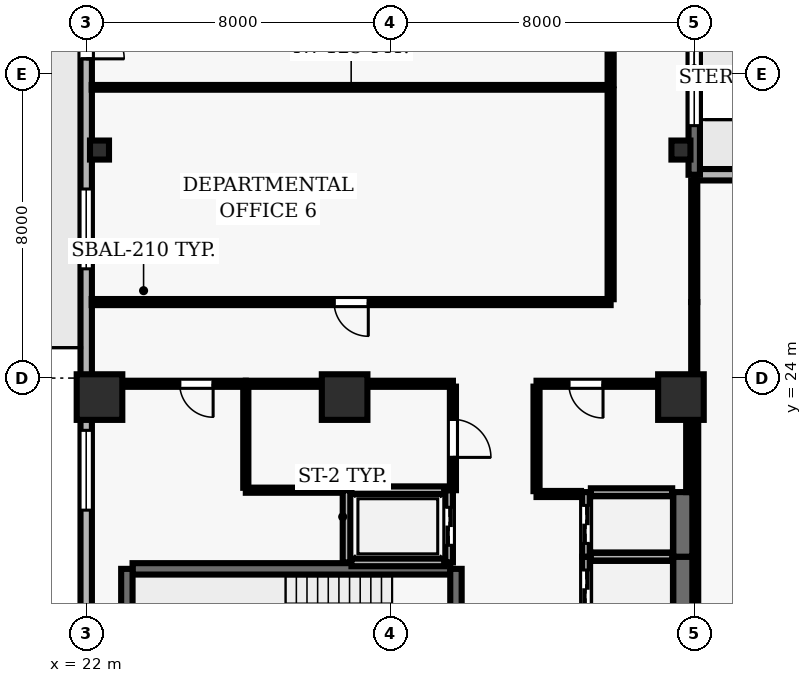
"""IFC4 building model, lengths in metres.
Left out: names, types, materials, properties, quantities, classifications, styles, units other than length and angle.
Written with IfcOpenShell. Run it as: python <this file> out.ifc"""

import sys

from ifc_helpers import new_model, si_unit, direction, frame, frame_2d, origin, origin_2d, place, context, subcontext, project, spatial, rectangle, hollow_rectangle, extrude, element, fill, save


model = new_model("IFC4")
c1 = context("Model", 3, precision=1e-05, world=origin(), true_north=direction((0.0, 1.0)))
c2 = subcontext(c1, "Body", "Model", "MODEL_VIEW")
j1 = project(units=[si_unit("LENGTHUNIT", "METRE"), si_unit("PLANEANGLEUNIT", "RADIAN")], contexts=[c1])
p1 = place(None, origin())
s1 = spatial("IfcSite", under=j1, at=p1, CompositionType="ELEMENT")
p2 = place(p1, origin())
s2 = spatial("IfcBuilding", under=s1, at=p2, CompositionType="ELEMENT")
p3 = place(p2, frame((0.0, 0.0, 115.1)))
s3 = spatial("IfcBuildingStorey", under=s2, at=p3, CompositionType="ELEMENT", Elevation=115.1)
for number, where, z_axis, x_axis in (
    (1, (22.35, 23.5, 0.0), (0.0, 0.0, 1.0), (1.0, 0.0, 0.0)),
    (2, (28.8, 23.5, 0.0), (0.0, 0.0, 1.0), (1.0, 0.0, 0.0)),
    (3, (37.65, 23.5, 0.0), (0.0, 0.0, 1.0), (1.0, 0.0, 0.0)),
):
    element("IfcColumn", number, at=place(p3, frame(where, z_axis=z_axis, x_axis=x_axis)), inside=s3, PredefinedType="COLUMN", context=c2, shape_type="SweptSolid", body=[
        extrude(rectangle(XDim=1.2, YDim=1.2, at=origin_2d()), origin(), (0.0, 0.0, 1.0), 3.9),
    ])
for number, where, z_axis, x_axis in (
    (4, (22.35, 30.0, 0.0), (0.0, 0.0, 1.0), (1.0, 0.0, 0.0)),
    (5, (37.65, 30.0, 0.0), (0.0, 0.0, 1.0), (1.0, 0.0, 0.0)),
):
    element("IfcColumn", number, at=place(p3, frame(where, z_axis=z_axis, x_axis=x_axis)), inside=s3, PredefinedType="COLUMN", context=c2, shape_type="SweptSolid", body=[
        extrude(hollow_rectangle(XDim=0.5, YDim=0.5, WallThickness=0.025, at=origin_2d()), origin(), (0.0, 0.0, 1.0), 3.9),
    ])
p4 = place(p3, frame((46.804, 29.35, 0.0), z_axis=(0.0, 0.0, 1.0), x_axis=(-1.0, 0.0, 0.0)))
e6 = element("IfcWall", 6, at=p4, inside=s3, PredefinedType="SOLIDWALL", context=c2, shape_type="SweptSolid", body=[
    extrude(rectangle(XDim=8.804, YDim=0.3, at=frame_2d((4.402, 0.0))), origin(), (0.0, 0.0, 1.0), 3.69),
])
p5 = place(p4, frame((3.727, 0.0, 0.0)))
e7 = element("IfcOpeningElement", 7, at=p5, cuts=e6, PredefinedType="OPENING", context=c2, shape_type="SweptSolid", body=[
    extrude(rectangle(XDim=1.35, YDim=2.2, at=frame_2d((0.675, 1.1))), frame((0.0, 0.16, 0.0), z_axis=(0.0, -1.0, 0.0), x_axis=(1.0, 0.0, 0.0)), (0.0, 0.0, 1.0), 0.32),
])
p6 = place(p3, frame((38.0, 29.35, 0.0), z_axis=(0.0, 0.0, 1.0), x_axis=(0.0, 1.0, 0.0)))
e8 = element("IfcWall", 8, at=p6, inside=s3, PredefinedType="SOLIDWALL", context=c2, shape_type="SweptSolid", body=[
    extrude(rectangle(XDim=16.75, YDim=0.3, at=frame_2d((8.375, 0.0))), origin(), (0.0, 0.0, 1.0), 3.69),
])
p7 = place(p6, frame((8.7, 0.0, 0.0)))
e9 = element("IfcOpeningElement", 9, at=p7, cuts=e8, PredefinedType="OPENING", context=c2, shape_type="SweptSolid", body=[
    extrude(rectangle(XDim=1.0, YDim=2.2, at=frame_2d((0.5, 1.1))), frame((0.0, 0.16, 0.0), z_axis=(0.0, -1.0, 0.0), x_axis=(1.0, 0.0, 0.0)), (0.0, 0.0, 1.0), 0.32),
])
p8 = place(p6, frame((1.292, 0.0, 0.9)))
e10 = element("IfcOpeningElement", 10, at=p8, cuts=e8, PredefinedType="OPENING", context=c2, shape_type="SweptSolid", body=[
    extrude(rectangle(XDim=3.0, YDim=2.2, at=frame_2d((1.5, 1.1))), frame((0.0, 0.16, 0.0), z_axis=(0.0, -1.0, 0.0), x_axis=(1.0, 0.0, 0.0)), (0.0, 0.0, 1.0), 0.32),
])
p9 = place(p6, frame((12.458, 0.0, 0.9)))
e11 = element("IfcOpeningElement", 11, at=p9, cuts=e8, PredefinedType="OPENING", context=c2, shape_type="SweptSolid", body=[
    extrude(rectangle(XDim=3.0, YDim=2.2, at=frame_2d((1.5, 1.1))), frame((0.0, 0.16, 0.0), z_axis=(0.0, -1.0, 0.0), x_axis=(1.0, 0.0, 0.0)), (0.0, 0.0, 1.0), 0.32),
])
p10 = place(p3, frame((22.0, 46.1, 0.0), z_axis=(0.0, 0.0, 1.0), x_axis=(0.0, -1.0, 0.0)))
e12 = element("IfcWall", 12, at=p10, inside=s3, PredefinedType="SOLIDWALL", context=c2, shape_type="SweptSolid", body=[
    extrude(rectangle(XDim=43.6, YDim=0.3, at=frame_2d((21.8, 0.0))), origin(), (0.0, 0.0, 1.0), 3.69),
])
p11 = place(p10, frame((12.7, 0.0, 0.0)))
e13 = element("IfcOpeningElement", 13, at=p11, cuts=e12, PredefinedType="OPENING", context=c2, shape_type="SweptSolid", body=[
    extrude(rectangle(XDim=1.0, YDim=2.2, at=frame_2d((0.5, 1.1))), frame((0.0, 0.16, 0.0), z_axis=(0.0, -1.0, 0.0), x_axis=(1.0, 0.0, 0.0)), (0.0, 0.0, 1.0), 0.32),
])
p12 = place(p10, frame((17.125, 0.0, 0.9)))
e14 = element("IfcOpeningElement", 14, at=p12, cuts=e12, PredefinedType="OPENING", context=c2, shape_type="SweptSolid", body=[
    extrude(rectangle(XDim=2.1, YDim=1.6, at=frame_2d((1.05, 0.8))), frame((0.0, 0.16, 0.0), z_axis=(0.0, -1.0, 0.0), x_axis=(1.0, 0.0, 0.0)), (0.0, 0.0, 1.0), 0.32),
])
p13 = place(p10, frame((23.475, 0.0, 0.9)))
e15 = element("IfcOpeningElement", 15, at=p13, cuts=e12, PredefinedType="OPENING", context=c2, shape_type="SweptSolid", body=[
    extrude(rectangle(XDim=2.1, YDim=1.6, at=frame_2d((1.05, 0.8))), frame((0.0, 0.16, 0.0), z_axis=(0.0, -1.0, 0.0), x_axis=(1.0, 0.0, 0.0)), (0.0, 0.0, 1.0), 0.32),
])
p14 = place(p10, frame((28.475, 0.0, 0.9)))
e16 = element("IfcOpeningElement", 16, at=p14, cuts=e12, PredefinedType="OPENING", context=c2, shape_type="SweptSolid", body=[
    extrude(rectangle(XDim=2.1, YDim=1.6, at=frame_2d((1.05, 0.8))), frame((0.0, 0.16, 0.0), z_axis=(0.0, -1.0, 0.0), x_axis=(1.0, 0.0, 0.0)), (0.0, 0.0, 1.0), 0.32),
])
p15 = place(p10, frame((34.375, 0.0, 0.9)))
e17 = element("IfcOpeningElement", 17, at=p15, cuts=e12, PredefinedType="OPENING", context=c2, shape_type="SweptSolid", body=[
    extrude(rectangle(XDim=2.1, YDim=1.6, at=frame_2d((1.05, 0.8))), frame((0.0, 0.16, 0.0), z_axis=(0.0, -1.0, 0.0), x_axis=(1.0, 0.0, 0.0)), (0.0, 0.0, 1.0), 0.32),
])
p16 = place(p3, frame((31.58, 18.98, 0.0), z_axis=(0.0, 0.0, 1.0), x_axis=(-1.0, 0.0, 0.0)))
e18 = element("IfcWall", 18, at=p16, inside=s3, PredefinedType="SHEAR", context=c2, shape_type="SweptSolid", body=[
    extrude(rectangle(XDim=8.36, YDim=0.3, at=frame_2d((4.18, 0.0))), origin(), (0.0, 0.0, 1.0), 3.69),
])
p17 = place(p3, frame((23.07, 18.98, 0.0), z_axis=(0.0, 0.0, 1.0), x_axis=(0.0, -1.0, 0.0)))
e19 = element("IfcWall", 19, at=p17, inside=s3, PredefinedType="SHEAR", context=c2, shape_type="SweptSolid", body=[
    extrude(rectangle(XDim=3.51, YDim=0.3, at=frame_2d((1.755, 0.0))), origin(), (0.0, 0.0, 1.0), 3.69),
])
p18 = place(p3, frame((31.73, 15.47, 0.0), z_axis=(0.0, 0.0, 1.0), x_axis=(0.0, 1.0, 0.0)))
e20 = element("IfcWall", 20, at=p18, inside=s3, PredefinedType="SHEAR", context=c2, shape_type="SweptSolid", body=[
    extrude(rectangle(XDim=3.51, YDim=0.3, at=frame_2d((1.755, 0.0))), origin(), (0.0, 0.0, 1.0), 3.69),
])
p19 = place(p18, frame((1.18, 0.0, 0.0)))
e21 = element("IfcOpeningElement", 21, at=p19, cuts=e20, PredefinedType="OPENING", context=c2, shape_type="SweptSolid", body=[
    extrude(rectangle(XDim=1.15, YDim=2.15, at=frame_2d((0.575, 1.075))), frame((0.0, 0.16, 0.0), z_axis=(0.0, -1.0, 0.0), x_axis=(1.0, 0.0, 0.0)), (0.0, 0.0, 1.0), 0.32),
])
p20 = place(p3, frame((35.15, 19.3, 0.0), z_axis=(0.0, 0.0, 1.0), x_axis=(0.0, -1.0, 0.0)))
e22 = element("IfcWall", 22, at=p20, inside=s3, PredefinedType="SOLIDWALL", context=c2, shape_type="SweptSolid", body=[
    extrude(rectangle(XDim=1.7, YDim=0.2, at=frame_2d((0.85, 0.0))), origin(), (0.0, 0.0, 1.0), 3.69),
])
p21 = place(p20, frame((0.35, 0.0, 0.0)))
e23 = element("IfcOpeningElement", 23, at=p21, cuts=e22, PredefinedType="OPENING", context=c2, shape_type="SweptSolid", body=[
    extrude(rectangle(XDim=1.0, YDim=2.1, at=frame_2d((0.5, 1.05))), frame((0.0, 0.11, 0.0), z_axis=(0.0, -1.0, 0.0), x_axis=(1.0, 0.0, 0.0)), (0.0, 0.0, 1.0), 0.22),
])
p22 = place(p3, frame((37.7, 17.6, 0.0), z_axis=(0.0, 0.0, 1.0), x_axis=(0.0, 1.0, 0.0)))
e24 = element("IfcWall", 24, at=p22, inside=s3, PredefinedType="SHEAR", context=c2, shape_type="SweptSolid", body=[
    extrude(rectangle(XDim=1.7, YDim=0.5, at=frame_2d((0.85, 0.0))), origin(), (0.0, 0.0, 1.0), 3.69),
])
p23 = place(p3, frame((37.42, 19.3, 0.0), z_axis=(0.0, 0.0, 1.0), x_axis=(-1.0, 0.0, 0.0)))
e25 = element("IfcWall", 25, at=p23, inside=s3, PredefinedType="SOLIDWALL", context=c2, shape_type="SweptSolid", body=[
    extrude(rectangle(XDim=2.14, YDim=0.2, at=frame_2d((1.07, 0.0))), origin(), (0.0, 0.0, 1.0), 3.69),
])
p24 = place(p3, frame((35.15, 21.0, 0.0), z_axis=(0.0, 0.0, 1.0), x_axis=(0.0, -1.0, 0.0)))
e26 = element("IfcWall", 26, at=p24, inside=s3, PredefinedType="SOLIDWALL", context=c2, shape_type="SweptSolid", body=[
    extrude(rectangle(XDim=1.7, YDim=0.2, at=frame_2d((0.85, 0.0))), origin(), (0.0, 0.0, 1.0), 3.69),
])
p25 = place(p24, frame((0.35, 0.0, 0.0)))
e27 = element("IfcOpeningElement", 27, at=p25, cuts=e26, PredefinedType="OPENING", context=c2, shape_type="SweptSolid", body=[
    extrude(rectangle(XDim=1.0, YDim=2.1, at=frame_2d((0.5, 1.05))), frame((0.0, 0.11, 0.0), z_axis=(0.0, -1.0, 0.0), x_axis=(1.0, 0.0, 0.0)), (0.0, 0.0, 1.0), 0.22),
])
p26 = place(p3, frame((37.7, 19.3, 0.0), z_axis=(0.0, 0.0, 1.0), x_axis=(0.0, 1.0, 0.0)))
e28 = element("IfcWall", 28, at=p26, inside=s3, PredefinedType="SHEAR", context=c2, shape_type="SweptSolid", body=[
    extrude(rectangle(XDim=1.7, YDim=0.5, at=frame_2d((0.85, 0.0))), origin(), (0.0, 0.0, 1.0), 3.69),
])
p27 = place(p3, frame((37.42, 21.0, 0.0), z_axis=(0.0, 0.0, 1.0), x_axis=(-1.0, 0.0, 0.0)))
e29 = element("IfcWall", 29, at=p27, inside=s3, PredefinedType="SOLIDWALL", context=c2, shape_type="SweptSolid", body=[
    extrude(rectangle(XDim=2.14, YDim=0.2, at=frame_2d((1.07, 0.0))), origin(), (0.0, 0.0, 1.0), 3.69),
])
p28 = place(p3, frame((28.85, 21.05, 0.0), z_axis=(0.0, 0.0, 1.0), x_axis=(0.0, -1.0, 0.0)))
e30 = element("IfcWall", 30, at=p28, inside=s3, PredefinedType="SOLIDWALL", context=c2, shape_type="SweptSolid", body=[
    extrude(rectangle(XDim=1.9, YDim=0.2, at=frame_2d((0.95, 0.0))), origin(), (0.0, 0.0, 1.0), 3.69),
])
p29 = place(p3, frame((31.55, 19.15, 0.0), z_axis=(0.0, 0.0, 1.0), x_axis=(0.0, 1.0, 0.0)))
e31 = element("IfcWall", 31, at=p29, inside=s3, PredefinedType="SOLIDWALL", context=c2, shape_type="SweptSolid", body=[
    extrude(rectangle(XDim=1.9, YDim=0.2, at=frame_2d((0.95, 0.0))), origin(), (0.0, 0.0, 1.0), 3.69),
])
p30 = place(p29, frame((0.45, 0.0, 0.0)))
e32 = element("IfcOpeningElement", 32, at=p30, cuts=e31, PredefinedType="OPENING", context=c2, shape_type="SweptSolid", body=[
    extrude(rectangle(XDim=1.0, YDim=2.1, at=frame_2d((0.5, 1.05))), frame((0.0, 0.11, 0.0), z_axis=(0.0, -1.0, 0.0), x_axis=(1.0, 0.0, 0.0)), (0.0, 0.0, 1.0), 0.22),
])
for number, where, z_axis, x_axis in (
    (33, (28.98, 19.15, 0.0), (0.0, 0.0, 1.0), (1.0, 0.0, 0.0)),
    (34, (31.42, 21.05, 0.0), (0.0, 0.0, 1.0), (-1.0, 0.0, 0.0)),
):
    element("IfcWall", number, at=place(p3, frame(where, z_axis=z_axis, x_axis=x_axis)), inside=s3, PredefinedType="SOLIDWALL", context=c2, shape_type="SweptSolid", body=[
        extrude(rectangle(XDim=2.44, YDim=0.2, at=frame_2d((1.22, 0.0))), origin(), (0.0, 0.0, 1.0), 3.69),
    ])
p31 = place(p3, frame((26.2, 21.05, 0.0), z_axis=(0.0, 0.0, 1.0), x_axis=(1.0, 0.0, 0.0)))
e35 = element("IfcWall", 35, at=p31, inside=s3, PredefinedType="PARTITIONING", context=c2, shape_type="SweptSolid", body=[
    extrude(rectangle(XDim=2.52, YDim=0.135, at=frame_2d((1.26, 0.0))), origin(), (0.0, 0.0, 1.0), 3.69),
])
p32 = place(p3, frame((26.2, 23.85, 0.0), z_axis=(0.0, 0.0, 1.0), x_axis=(-1.0, 0.0, 0.0)))
e36 = element("IfcWall", 36, at=p32, inside=s3, PredefinedType="PARTITIONING", context=c2, shape_type="SweptSolid", body=[
    extrude(rectangle(XDim=4.0, YDim=0.16, at=frame_2d((2.0, 0.0))), origin(), (0.0, 0.0, 1.0), 3.073),
])
p33 = place(p32, frame((0.86, 0.0, 0.0)))
e37 = element("IfcOpeningElement", 37, at=p33, cuts=e36, PredefinedType="OPENING", context=c2, shape_type="SweptSolid", body=[
    extrude(rectangle(XDim=0.88, YDim=2.1, at=frame_2d((0.44, 1.05))), frame((0.0, 0.09, 0.0), z_axis=(0.0, -1.0, 0.0), x_axis=(1.0, 0.0, 0.0)), (0.0, 0.0, 1.0), 0.18),
])
p34 = place(p3, frame((31.65, 23.85, 0.0), z_axis=(0.0, 0.0, 1.0), x_axis=(-1.0, 0.0, 0.0)))
e38 = element("IfcWall", 38, at=p34, inside=s3, PredefinedType="PARTITIONING", context=c2, shape_type="SweptSolid", body=[
    extrude(rectangle(XDim=5.45, YDim=0.16, at=frame_2d((2.725, 0.0))), origin(), (0.0, 0.0, 1.0), 3.073),
])
p35 = place(p3, frame((35.02, 20.95, 0.0), z_axis=(0.0, 0.0, 1.0), x_axis=(-1.0, 0.0, 0.0)))
e39 = element("IfcWall", 39, at=p35, inside=s3, PredefinedType="PARTITIONING", context=c2, shape_type="SweptSolid", body=[
    extrude(rectangle(XDim=1.17, YDim=0.16, at=frame_2d((0.585, 0.0))), origin(), (0.0, 0.0, 1.0), 3.69),
])
p36 = place(p3, frame((35.8, 26.0, 0.0), z_axis=(0.0, 0.0, 1.0), x_axis=(-1.0, 0.0, 0.0)))
e40 = element("IfcWall", 40, at=p36, inside=s3, PredefinedType="PARTITIONING", context=c2, shape_type="SweptSolid", body=[
    extrude(rectangle(XDim=13.655, YDim=0.16, at=frame_2d((6.828, 0.0))), origin(), (0.0, 0.0, 1.0), 3.69),
])
p37 = place(p36, frame((6.377, 0.0, 0.0)))
e41 = element("IfcOpeningElement", 41, at=p37, cuts=e40, PredefinedType="OPENING", context=c2, shape_type="SweptSolid", body=[
    extrude(rectangle(XDim=0.9, YDim=2.1, at=frame_2d((0.45, 1.05))), frame((0.0, 0.09, 0.0), z_axis=(0.0, -1.0, 0.0), x_axis=(1.0, 0.0, 0.0)), (0.0, 0.0, 1.0), 0.18),
])
p38 = place(p3, frame((35.8, 31.65, 0.0), z_axis=(0.0, 0.0, 1.0), x_axis=(-1.0, 0.0, 0.0)))
e42 = element("IfcWall", 42, at=p38, inside=s3, PredefinedType="PARTITIONING", context=c2, shape_type="SweptSolid", body=[
    extrude(rectangle(XDim=13.655, YDim=0.125, at=frame_2d((6.828, 0.0))), origin(), (0.0, 0.0, 1.0), 3.69),
])
p39 = place(p3, frame((37.85, 23.85, 0.0), z_axis=(0.0, 0.0, 1.0), x_axis=(-1.0, 0.0, 0.0)))
e43 = element("IfcWall", 43, at=p39, inside=s3, PredefinedType="PARTITIONING", context=c2, shape_type="SweptSolid", body=[
    extrude(rectangle(XDim=4.0, YDim=0.16, at=frame_2d((2.0, 0.0))), origin(), (0.0, 0.0, 1.0), 3.073),
])
p40 = place(p39, frame((2.25, 0.0, 0.0)))
e44 = element("IfcOpeningElement", 44, at=p40, cuts=e43, PredefinedType="OPENING", context=c2, shape_type="SweptSolid", body=[
    extrude(rectangle(XDim=0.9, YDim=2.1, at=frame_2d((0.45, 1.05))), frame((0.0, 0.09, 0.0), z_axis=(0.0, -1.0, 0.0), x_axis=(1.0, 0.0, 0.0)), (0.0, 0.0, 1.0), 0.18),
])
p41 = place(p3, frame((26.2, 23.775, 0.0), z_axis=(0.0, 0.0, 1.0), x_axis=(0.0, -1.0, 0.0)))
e45 = element("IfcWall", 45, at=p41, inside=s3, PredefinedType="PARTITIONING", context=c2, shape_type="SweptSolid", body=[
    extrude(rectangle(XDim=2.662, YDim=0.135, at=frame_2d((1.331, 0.0))), origin(), (0.0, 0.0, 1.0), 3.69),
])
p42 = place(p3, frame((31.65, 23.775, 0.0), z_axis=(0.0, 0.0, 1.0), x_axis=(0.0, -1.0, 0.0)))
e46 = element("IfcWall", 46, at=p42, inside=s3, PredefinedType="PARTITIONING", context=c2, shape_type="SweptSolid", body=[
    extrude(rectangle(XDim=2.725, YDim=0.16, at=frame_2d((1.362, 0.0))), origin(), (0.0, 0.0, 1.0), 3.69),
])
p43 = place(p42, frame((0.862, 0.0, 0.0)))
e47 = element("IfcOpeningElement", 47, at=p43, cuts=e46, PredefinedType="OPENING", context=c2, shape_type="SweptSolid", body=[
    extrude(rectangle(XDim=1.0, YDim=2.1, at=frame_2d((0.5, 1.05))), frame((0.0, 0.09, 0.0), z_axis=(0.0, -1.0, 0.0), x_axis=(1.0, 0.0, 0.0)), (0.0, 0.0, 1.0), 0.18),
])
p44 = place(p3, frame((33.85, 21.025, 0.0), z_axis=(0.0, 0.0, 1.0), x_axis=(0.0, 1.0, 0.0)))
e48 = element("IfcWall", 48, at=p44, inside=s3, PredefinedType="PARTITIONING", context=c2, shape_type="SweptSolid", body=[
    extrude(rectangle(XDim=2.75, YDim=0.16, at=frame_2d((1.375, 0.0))), origin(), (0.0, 0.0, 1.0), 3.69),
])
p45 = place(p3, frame((35.8, 31.592, 0.0), z_axis=(0.0, 0.0, 1.0), x_axis=(0.0, -1.0, 0.0)))
e49 = element("IfcWall", 49, at=p45, inside=s3, PredefinedType="PARTITIONING", context=c2, shape_type="SweptSolid", body=[
    extrude(rectangle(XDim=5.517, YDim=0.16, at=frame_2d((2.759, 0.0))), origin(), (0.0, 0.0, 1.0), 3.69),
])
p46 = place(p3, frame((35.8, 37.242, 0.0), z_axis=(0.0, 0.0, 1.0), x_axis=(0.0, -1.0, 0.0)))
e50 = element("IfcWall", 50, at=p46, inside=s3, PredefinedType="PARTITIONING", context=c2, shape_type="SweptSolid", body=[
    extrude(rectangle(XDim=5.535, YDim=0.16, at=frame_2d((2.768, 0.0))), origin(), (0.0, 0.0, 1.0), 3.69),
])
p47 = place(p46, frame((2.317, 0.0, 0.0)))
e51 = element("IfcOpeningElement", 51, at=p47, cuts=e50, PredefinedType="OPENING", context=c2, shape_type="SweptSolid", body=[
    extrude(rectangle(XDim=0.9, YDim=2.1, at=frame_2d((0.45, 1.05))), frame((0.0, 0.09, 0.0), z_axis=(0.0, -1.0, 0.0), x_axis=(1.0, 0.0, 0.0)), (0.0, 0.0, 1.0), 0.18),
])
p48 = place(p3, frame((37.85, 21.0, 0.0), z_axis=(0.0, 0.0, 1.0), x_axis=(0.0, 1.0, 0.0)))
e52 = element("IfcWall", 52, at=p48, inside=s3, PredefinedType="PARTITIONING", context=c2, shape_type="SweptSolid", body=[
    extrude(rectangle(XDim=2.775, YDim=0.125, at=frame_2d((1.387, 0.0))), origin(), (0.0, 0.0, 1.0), 3.073),
])
p49 = place(p3, frame((38.0, 23.85, 0.0), z_axis=(0.0, 0.0, 1.0), x_axis=(0.0, 1.0, 0.0)))
e53 = element("IfcWall", 53, at=p49, inside=s3, PredefinedType="PARTITIONING", context=c2, shape_type="SweptSolid", body=[
    extrude(rectangle(XDim=2.15, YDim=0.16, at=frame_2d((1.075, 0.0))), origin(), (0.0, 0.0, 1.0), 3.073),
])
p50 = place(p3, frame((38.0, 26.0, 0.0), z_axis=(0.0, 0.0, 1.0), x_axis=(0.0, 1.0, 0.0)))
e54 = element("IfcWall", 54, at=p50, inside=s3, PredefinedType="PARTITIONING", context=c2, shape_type="SweptSolid", body=[
    extrude(rectangle(XDim=3.205, YDim=0.16, at=frame_2d((1.603, 0.0))), origin(), (0.0, 0.0, 1.0), 3.073),
])
p51 = place(p3, frame((38.05, 23.85, 0.0), z_axis=(0.0, 0.0, 1.0), x_axis=(0.0, -1.0, 0.0)))
e55 = element("IfcWall", 55, at=p51, inside=s3, PredefinedType="MOVABLE", context=c2, shape_type="SweptSolid", body=[
    extrude(rectangle(XDim=7.775, YDim=0.11, at=frame_2d((3.888, 0.0))), origin(), (0.0, 0.0, 1.0), 3.073),
])
p52 = place(p8, origin())
e56 = element("IfcWindow", 56, at=p52, inside=s3, PartitioningType="SINGLE_PANEL", PredefinedType="WINDOW", context=c2, shape_type="SweptSolid", body=[
    extrude(rectangle(XDim=3.0, YDim=2.2, at=frame_2d((1.5, 1.1))), frame((0.0, 0.03, 0.0), z_axis=(0.0, -1.0, 0.0), x_axis=(1.0, 0.0, 0.0)), (0.0, 0.0, 1.0), 0.06),
])
fill(e10, e56)
p53 = place(p11, origin())
e57 = element("IfcDoor", 57, at=p53, inside=s3, OperationType="SINGLE_SWING_RIGHT", PredefinedType="DOOR", context=c2, shape_type="SweptSolid", body=[
    extrude(rectangle(XDim=1.0, YDim=2.2, at=frame_2d((0.5, 1.1))), frame((0.0, 0.025, 0.0), z_axis=(0.0, -1.0, 0.0), x_axis=(1.0, 0.0, 0.0)), (0.0, 0.0, 1.0), 0.05),
])
fill(e13, e57)
p54 = place(p12, origin())
e58 = element("IfcWindow", 58, at=p54, inside=s3, PartitioningType="SINGLE_PANEL", PredefinedType="WINDOW", context=c2, shape_type="SweptSolid", body=[
    extrude(rectangle(XDim=2.1, YDim=1.6, at=frame_2d((1.05, 0.8))), frame((0.0, 0.03, 0.0), z_axis=(0.0, -1.0, 0.0), x_axis=(1.0, 0.0, 0.0)), (0.0, 0.0, 1.0), 0.06),
])
fill(e14, e58)
p55 = place(p13, origin())
e59 = element("IfcWindow", 59, at=p55, inside=s3, PartitioningType="SINGLE_PANEL", PredefinedType="WINDOW", context=c2, shape_type="SweptSolid", body=[
    extrude(rectangle(XDim=2.1, YDim=1.6, at=frame_2d((1.05, 0.8))), frame((0.0, 0.03, 0.0), z_axis=(0.0, -1.0, 0.0), x_axis=(1.0, 0.0, 0.0)), (0.0, 0.0, 1.0), 0.06),
])
fill(e15, e59)
p56 = place(p21, origin())
e60 = element("IfcDoor", 60, at=p56, inside=s3, OperationType="DOUBLE_DOOR_SLIDING", PredefinedType="DOOR", context=c2, shape_type="SweptSolid", body=[
    extrude(rectangle(XDim=1.0, YDim=2.1, at=frame_2d((0.5, 1.05))), frame((0.0, 0.025, 0.0), z_axis=(0.0, -1.0, 0.0), x_axis=(1.0, 0.0, 0.0)), (0.0, 0.0, 1.0), 0.05),
])
fill(e23, e60)
p57 = place(p25, origin())
e61 = element("IfcDoor", 61, at=p57, inside=s3, OperationType="DOUBLE_DOOR_SLIDING", PredefinedType="DOOR", context=c2, shape_type="SweptSolid", body=[
    extrude(rectangle(XDim=1.0, YDim=2.1, at=frame_2d((0.5, 1.05))), frame((0.0, 0.025, 0.0), z_axis=(0.0, -1.0, 0.0), x_axis=(1.0, 0.0, 0.0)), (0.0, 0.0, 1.0), 0.05),
])
fill(e27, e61)
p58 = place(p30, origin())
e62 = element("IfcDoor", 62, at=p58, inside=s3, OperationType="DOUBLE_DOOR_SLIDING", PredefinedType="DOOR", context=c2, shape_type="SweptSolid", body=[
    extrude(rectangle(XDim=1.0, YDim=2.1, at=frame_2d((0.5, 1.05))), frame((0.0, 0.025, 0.0), z_axis=(0.0, -1.0, 0.0), x_axis=(1.0, 0.0, 0.0)), (0.0, 0.0, 1.0), 0.05),
])
fill(e32, e62)
p59 = place(p40, origin())
e63 = element("IfcDoor", 63, at=p59, inside=s3, OperationType="SINGLE_SWING_LEFT", PredefinedType="DOOR", context=c2, shape_type="SweptSolid", body=[
    extrude(rectangle(XDim=0.9, YDim=2.1, at=frame_2d((0.45, 1.05))), frame((0.0, 0.025, 0.0), z_axis=(0.0, -1.0, 0.0), x_axis=(1.0, 0.0, 0.0)), (0.0, 0.0, 1.0), 0.05),
])
fill(e44, e63)
p60 = place(p43, origin())
e64 = element("IfcDoor", 64, at=p60, inside=s3, OperationType="SINGLE_SWING_RIGHT", PredefinedType="DOOR", context=c2, shape_type="SweptSolid", body=[
    extrude(rectangle(XDim=1.0, YDim=2.1, at=frame_2d((0.5, 1.05))), frame((0.0, 0.025, 0.0), z_axis=(0.0, -1.0, 0.0), x_axis=(1.0, 0.0, 0.0)), (0.0, 0.0, 1.0), 0.05),
])
fill(e47, e64)
p61 = place(p33, origin())
e65 = element("IfcDoor", 65, at=p61, inside=s3, OperationType="SINGLE_SWING_LEFT", PredefinedType="DOOR", context=c2, shape_type="SweptSolid", body=[
    extrude(rectangle(XDim=0.88, YDim=2.1, at=frame_2d((0.44, 1.05))), frame((0.0, 0.025, 0.0), z_axis=(0.0, -1.0, 0.0), x_axis=(1.0, 0.0, 0.0)), (0.0, 0.0, 1.0), 0.05),
])
fill(e37, e65)
p62 = place(p37, origin())
e66 = element("IfcDoor", 66, at=p62, inside=s3, OperationType="SINGLE_SWING_LEFT", PredefinedType="DOOR", context=c2, shape_type="SweptSolid", body=[
    extrude(rectangle(XDim=0.9, YDim=2.1, at=frame_2d((0.45, 1.05))), frame((0.0, 0.025, 0.0), z_axis=(0.0, -1.0, 0.0), x_axis=(1.0, 0.0, 0.0)), (0.0, 0.0, 1.0), 0.05),
])
fill(e41, e66)
save(model, sys.argv[1])
